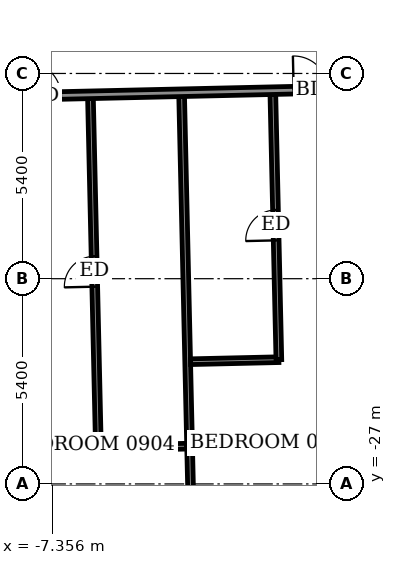
"""IFC4 building model, lengths in metres.
Left out: names, types, materials, properties, quantities, classifications, styles, units other than length and angle.
Written with IfcOpenShell. Run it as: python <this file> out.ifc"""

import sys

from ifc_helpers import new_model, si_unit, direction, frame, frame_2d, origin, place, context, subcontext, project, spatial, rectangle, extrude, element, fill, save


model = new_model("IFC4")
c1 = context("Model", 3, precision=1e-05, world=origin(), true_north=direction((0.0, 1.0)))
c2 = subcontext(c1, "Body", "Model", "MODEL_VIEW")
j1 = project(units=[si_unit("LENGTHUNIT", "METRE"), si_unit("PLANEANGLEUNIT", "RADIAN")], contexts=[c1])
p1 = place(None, origin())
s1 = spatial("IfcSite", under=j1, at=p1, CompositionType="ELEMENT")
p2 = place(p1, origin())
s2 = spatial("IfcBuilding", under=s1, at=p2, CompositionType="ELEMENT")
p3 = place(p2, frame((0.0, 0.0, 41.3)))
s3 = spatial("IfcBuildingStorey", under=s2, at=p3, CompositionType="ELEMENT", Elevation=41.3)
p4 = place(p3, frame((-3.675, -29.204, 0.0), z_axis=(0.0, 0.0, 1.0), x_axis=(-0.022739741597, 0.999741418644, 0.0)))
e1 = element("IfcWall", 1, at=p4, inside=s3, PredefinedType="PARTITIONING", context=c2, shape_type="SweptSolid", body=[
    extrude(rectangle(XDim=12.4, YDim=0.15, at=frame_2d((6.2, 0.0))), origin(), (0.0, 0.0, 1.0), 2.55),
])
p5 = place(p3, frame((-6.147, -26.059, 0.0), z_axis=(0.0, 0.0, 1.0), x_axis=(0.999749744571, 0.022370700241, 0.0)))
e2 = element("IfcWall", 2, at=p5, inside=s3, PredefinedType="PARTITIONING", context=c2, shape_type="SweptSolid", body=[
    extrude(rectangle(XDim=2.324, YDim=0.15, at=frame_2d((1.162, 0.0))), origin(), (0.0, 0.0, 1.0), 3.05),
])
p6 = place(p3, frame((-6.147, -26.059, 0.0), z_axis=(0.0, 0.0, 1.0), x_axis=(-0.022717185456, 0.999741931443, 0.0)))
e3 = element("IfcWall", 3, at=p6, inside=s3, PredefinedType="PARTITIONING", context=c2, shape_type="SweptSolid", body=[
    extrude(rectangle(XDim=9.199, YDim=0.15, at=frame_2d((4.6, 0.0))), origin(), (0.0, 0.0, 1.0), 3.05),
])
p7 = place(p6, frame((4.25, 0.0, 0.0)))
e4 = element("IfcOpeningElement", 4, at=p7, cuts=e3, PredefinedType="OPENING", context=c2, shape_type="SweptSolid", body=[
    extrude(rectangle(XDim=0.8, YDim=2.1, at=frame_2d((0.4, 1.05))), frame((0.0, 0.085, 0.0), z_axis=(0.0, -1.0, 0.0), x_axis=(1.0, 0.0, 0.0)), (0.0, 0.0, 1.0), 0.17),
])
p8 = place(p3, frame((-3.723, -23.784, 0.0), z_axis=(0.0, 0.0, 1.0), x_axis=(0.999740260747, 0.02279059109, 0.0)))
e5 = element("IfcWall", 5, at=p8, inside=s3, PredefinedType="PARTITIONING", context=c2, shape_type="SweptSolid", body=[
    extrude(rectangle(XDim=2.324, YDim=0.15, at=frame_2d((1.162, 0.0))), origin(), (0.0, 0.0, 1.0), 3.05),
])
p9 = place(p3, frame((-1.399, -23.731, 0.0), z_axis=(0.0, 0.0, 1.0), x_axis=(-0.022630826984, 0.999743890039, 0.0)))
e6 = element("IfcWall", 6, at=p9, inside=s3, PredefinedType="PARTITIONING", context=c2, shape_type="SweptSolid", body=[
    extrude(rectangle(XDim=6.98, YDim=0.15, at=frame_2d((3.49, 0.0))), origin(), (0.0, 0.0, 1.0), 3.05),
])
p10 = place(p9, frame((3.14, 0.0, 0.0)))
e7 = element("IfcOpeningElement", 7, at=p10, cuts=e6, PredefinedType="OPENING", context=c2, shape_type="SweptSolid", body=[
    extrude(rectangle(XDim=0.8, YDim=2.1, at=frame_2d((0.4, 1.05))), frame((0.0, 0.085, 0.0), z_axis=(0.0, -1.0, 0.0), x_axis=(1.0, 0.0, 0.0)), (0.0, 0.0, 1.0), 0.17),
])
p11 = place(p3, frame((-30.652, -17.313, 0.0), z_axis=(0.0, 0.0, 1.0), x_axis=(0.999742623764, 0.02268669719, 0.0)))
e8 = element("IfcWall", 8, at=p11, inside=s3, PredefinedType="PARTITIONING", context=c2, shape_type="SweptSolid", body=[
    extrude(rectangle(XDim=58.8, YDim=0.2, at=frame_2d((29.4, 0.0))), origin(), (0.0, 0.0, 1.0), 3.05),
])
p12 = place(p11, frame((3.406, 0.0, 0.0)))
e9 = element("IfcOpeningElement", 9, at=p12, cuts=e8, PredefinedType="OPENING", context=c2, shape_type="SweptSolid", body=[
    extrude(rectangle(XDim=1.0, YDim=2.1, at=frame_2d((0.5, 1.05))), frame((0.0, 0.11, 0.0), z_axis=(0.0, -1.0, 0.0), x_axis=(1.0, 0.0, 0.0)), (0.0, 0.0, 1.0), 0.22),
])
p13 = place(p11, frame((11.475, 0.0, 0.0)))
e10 = element("IfcOpeningElement", 10, at=p13, cuts=e8, PredefinedType="OPENING", context=c2, shape_type="SweptSolid", body=[
    extrude(rectangle(XDim=0.9, YDim=2.1, at=frame_2d((0.45, 1.05))), frame((0.0, 0.11, 0.0), z_axis=(0.0, -1.0, 0.0), x_axis=(1.0, 0.0, 0.0)), (0.0, 0.0, 1.0), 0.22),
])
p14 = place(p11, frame((13.55, 0.0, 0.0)))
e11 = element("IfcOpeningElement", 11, at=p14, cuts=e8, PredefinedType="OPENING", context=c2, shape_type="SweptSolid", body=[
    extrude(rectangle(XDim=0.9, YDim=2.1, at=frame_2d((0.45, 1.05))), frame((0.0, 0.11, 0.0), z_axis=(0.0, -1.0, 0.0), x_axis=(1.0, 0.0, 0.0)), (0.0, 0.0, 1.0), 0.22),
])
p15 = place(p11, frame((20.375, 0.0, 0.0)))
e12 = element("IfcOpeningElement", 12, at=p15, cuts=e8, PredefinedType="OPENING", context=c2, shape_type="SweptSolid", body=[
    extrude(rectangle(XDim=0.9, YDim=2.1, at=frame_2d((0.45, 1.05))), frame((0.0, 0.11, 0.0), z_axis=(0.0, -1.0, 0.0), x_axis=(1.0, 0.0, 0.0)), (0.0, 0.0, 1.0), 0.22),
])
p16 = place(p11, frame((22.625, 0.0, 0.0)))
e13 = element("IfcOpeningElement", 13, at=p16, cuts=e8, PredefinedType="OPENING", context=c2, shape_type="SweptSolid", body=[
    extrude(rectangle(XDim=0.9, YDim=2.1, at=frame_2d((0.45, 1.05))), frame((0.0, 0.11, 0.0), z_axis=(0.0, -1.0, 0.0), x_axis=(1.0, 0.0, 0.0)), (0.0, 0.0, 1.0), 0.22),
])
p17 = place(p11, frame((29.65, 0.0, 0.0)))
e14 = element("IfcOpeningElement", 14, at=p17, cuts=e8, PredefinedType="OPENING", context=c2, shape_type="SweptSolid", body=[
    extrude(rectangle(XDim=0.9, YDim=2.1, at=frame_2d((0.45, 1.05))), frame((0.0, 0.11, 0.0), z_axis=(0.0, -1.0, 0.0), x_axis=(1.0, 0.0, 0.0)), (0.0, 0.0, 1.0), 0.22),
])
p18 = place(p11, frame((31.875, 0.0, 0.0)))
e15 = element("IfcOpeningElement", 15, at=p18, cuts=e8, PredefinedType="OPENING", context=c2, shape_type="SweptSolid", body=[
    extrude(rectangle(XDim=0.9, YDim=2.1, at=frame_2d((0.45, 1.05))), frame((0.0, 0.11, 0.0), z_axis=(0.0, -1.0, 0.0), x_axis=(1.0, 0.0, 0.0)), (0.0, 0.0, 1.0), 0.22),
])
p19 = place(p11, frame((38.9, 0.0, 0.0)))
e16 = element("IfcOpeningElement", 16, at=p19, cuts=e8, PredefinedType="OPENING", context=c2, shape_type="SweptSolid", body=[
    extrude(rectangle(XDim=0.9, YDim=2.1, at=frame_2d((0.45, 1.05))), frame((0.0, 0.11, 0.0), z_axis=(0.0, -1.0, 0.0), x_axis=(1.0, 0.0, 0.0)), (0.0, 0.0, 1.0), 0.22),
])
p20 = place(p11, frame((41.025, 0.0, 0.0)))
e17 = element("IfcOpeningElement", 17, at=p20, cuts=e8, PredefinedType="OPENING", context=c2, shape_type="SweptSolid", body=[
    extrude(rectangle(XDim=0.9, YDim=2.1, at=frame_2d((0.45, 1.05))), frame((0.0, 0.11, 0.0), z_axis=(0.0, -1.0, 0.0), x_axis=(1.0, 0.0, 0.0)), (0.0, 0.0, 1.0), 0.22),
])
p21 = place(p11, frame((47.95, 0.0, 0.0)))
e18 = element("IfcOpeningElement", 18, at=p21, cuts=e8, PredefinedType="OPENING", context=c2, shape_type="SweptSolid", body=[
    extrude(rectangle(XDim=0.9, YDim=2.1, at=frame_2d((0.45, 1.05))), frame((0.0, 0.11, 0.0), z_axis=(0.0, -1.0, 0.0), x_axis=(1.0, 0.0, 0.0)), (0.0, 0.0, 1.0), 0.22),
])
p22 = place(p11, frame((55.6, 0.0, 0.0)))
e19 = element("IfcOpeningElement", 19, at=p22, cuts=e8, PredefinedType="OPENING", context=c2, shape_type="SweptSolid", body=[
    extrude(rectangle(XDim=1.0, YDim=2.1, at=frame_2d((0.5, 1.05))), frame((0.0, 0.11, 0.0), z_axis=(0.0, -1.0, 0.0), x_axis=(1.0, 0.0, 0.0)), (0.0, 0.0, 1.0), 0.22),
])
p23 = place(p11, frame((50.25, 0.0, 0.0)))
e20 = element("IfcOpeningElement", 20, at=p23, cuts=e8, PredefinedType="OPENING", context=c2, shape_type="SweptSolid", body=[
    extrude(rectangle(XDim=0.9, YDim=2.1, at=frame_2d((0.45, 1.05))), frame((0.0, 0.11, 0.0), z_axis=(0.0, -1.0, 0.0), x_axis=(1.0, 0.0, 0.0)), (0.0, 0.0, 1.0), 0.22),
])
p24 = place(p16, origin())
e21 = element("IfcDoor", 21, at=p24, inside=s3, OperationType="SINGLE_SWING_RIGHT", PredefinedType="DOOR", context=c2, shape_type="SweptSolid", body=[
    extrude(rectangle(XDim=0.9, YDim=2.1, at=frame_2d((0.45, 1.05))), frame((0.0, 0.025, 0.0), z_axis=(0.0, -1.0, 0.0), x_axis=(1.0, 0.0, 0.0)), (0.0, 0.0, 1.0), 0.05),
])
fill(e13, e21)
p25 = place(p7, origin())
e22 = element("IfcDoor", 22, at=p25, inside=s3, OperationType="SINGLE_SWING_RIGHT", PredefinedType="DOOR", context=c2, shape_type="SweptSolid", body=[
    extrude(rectangle(XDim=0.8, YDim=2.1, at=frame_2d((0.4, 1.05))), frame((0.0, 0.025, 0.0), z_axis=(0.0, -1.0, 0.0), x_axis=(1.0, 0.0, 0.0)), (0.0, 0.0, 1.0), 0.05),
])
fill(e4, e22)
p26 = place(p17, origin())
e23 = element("IfcDoor", 23, at=p26, inside=s3, OperationType="SINGLE_SWING_LEFT", PredefinedType="DOOR", context=c2, shape_type="SweptSolid", body=[
    extrude(rectangle(XDim=0.9, YDim=2.1, at=frame_2d((0.45, 1.05))), frame((0.0, 0.025, 0.0), z_axis=(0.0, -1.0, 0.0), x_axis=(1.0, 0.0, 0.0)), (0.0, 0.0, 1.0), 0.05),
])
fill(e14, e23)
p27 = place(p10, origin())
e24 = element("IfcDoor", 24, at=p27, inside=s3, OperationType="SINGLE_SWING_LEFT", PredefinedType="DOOR", context=c2, shape_type="SweptSolid", body=[
    extrude(rectangle(XDim=0.8, YDim=2.1, at=frame_2d((0.4, 1.05))), frame((0.0, 0.025, 0.0), z_axis=(0.0, -1.0, 0.0), x_axis=(1.0, 0.0, 0.0)), (0.0, 0.0, 1.0), 0.05),
])
fill(e7, e24)
save(model, sys.argv[1])
